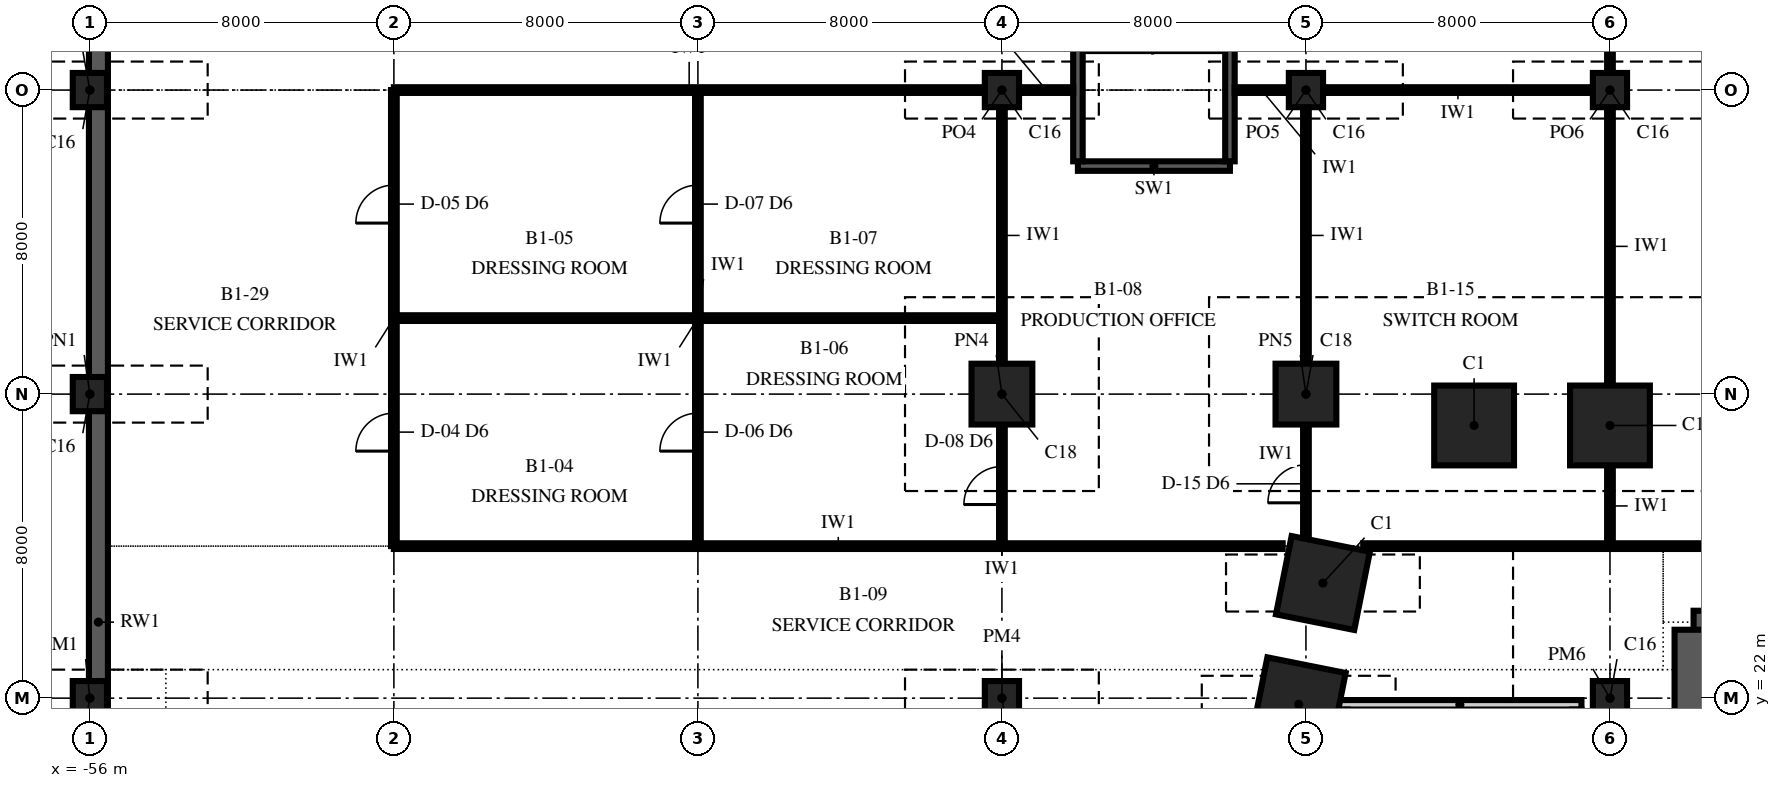
"""IFC4 building model, lengths in metres.
Left out: names, types, materials, properties, quantities, classifications, styles, units other than length and angle.
Written with IfcOpenShell. Run it as: python <this file> out.ifc"""

import sys

from ifc_helpers import new_model, si_unit, direction, frame, frame_2d, origin, origin_2d, place, context, subcontext, project, spatial, polyline, rectangle, outline, extrude, element, fill, save


model = new_model("IFC4")
c1 = context("Model", 3, precision=1e-05, world=origin(), true_north=direction((0.0, 1.0)))
c2 = subcontext(c1, "Body", "Model", "MODEL_VIEW")
j1 = project(units=[si_unit("LENGTHUNIT", "METRE"), si_unit("PLANEANGLEUNIT", "RADIAN")], contexts=[c1])
p1 = place(None, origin())
s1 = spatial("IfcSite", under=j1, at=p1, CompositionType="ELEMENT")
p2 = place(p1, origin())
s2 = spatial("IfcBuilding", under=s1, at=p2, CompositionType="ELEMENT")
p3 = place(p2, frame((0.0, 0.0, -7.0)))
s3 = spatial("IfcBuildingStorey", under=s2, at=p3, CompositionType="ELEMENT", Elevation=-7.0)
for number, where, z_axis, x_axis in (
    (1, (-16.0, 29.175, -0.6), (0.0, 0.0, 1.0), (-1.0, 0.0, 0.0)),
    (2, (-19.575, 29.175, -0.6), (0.0, 0.0, 1.0), (-1.0, 0.0, 0.0)),
    (3, (-23.553, 25.029, -0.6), (0.0, 0.0, 1.0), (-0.196, -0.981, 0.0)),
    (4, (-24.191, 21.838, -0.6), (0.0, 0.0, 1.0), (-0.196, -0.981, 0.0)),
):
    element("IfcColumn", number, at=place(p3, frame(where, z_axis=z_axis, x_axis=x_axis)), inside=s3, PredefinedType="COLUMN", context=c2, shape_type="SweptSolid", body=[
        extrude(rectangle(XDim=2.1, YDim=2.1, at=origin_2d()), origin(), (0.0, 0.0, 1.0), 7.6),
    ])
for number, where, z_axis, x_axis in (
    (5, (-56.0, 22.0, -0.6), (0.0, 0.0, 1.0), (1.0, 0.0, 0.0)),
    (6, (-56.0, 30.0, -0.6), (0.0, 0.0, 1.0), (1.0, 0.0, 0.0)),
    (7, (-56.0, 38.0, -0.6), (0.0, 0.0, 1.0), (1.0, 0.0, 0.0)),
    (8, (-32.0, 22.0, -0.6), (0.0, 0.0, 1.0), (1.0, 0.0, 0.0)),
):
    element("IfcColumn", number, at=place(p3, frame(where, z_axis=z_axis, x_axis=x_axis)), inside=s3, PredefinedType="COLUMN", context=c2, shape_type="SweptSolid", body=[
        extrude(rectangle(XDim=0.9, YDim=0.9, at=origin_2d()), origin(), (0.0, 0.0, 1.0), 7.6),
    ])
p4 = place(p3, frame((-32.0, 30.0, -0.6), z_axis=(0.0, 0.0, 1.0), x_axis=(1.0, 0.0, 0.0)))
e9 = element("IfcColumn", 9, at=p4, inside=s3, PredefinedType="COLUMN", context=c2, shape_type="SweptSolid", body=[
    extrude(rectangle(XDim=1.6, YDim=1.6, at=origin_2d()), origin(), (0.0, 0.0, 1.0), 7.6),
])
p5 = place(p3, frame((-32.0, 38.0, -0.6), z_axis=(0.0, 0.0, 1.0), x_axis=(1.0, 0.0, 0.0)))
e10 = element("IfcColumn", 10, at=p5, inside=s3, PredefinedType="COLUMN", context=c2, shape_type="SweptSolid", body=[
    extrude(rectangle(XDim=0.9, YDim=0.9, at=origin_2d()), origin(), (0.0, 0.0, 1.0), 7.6),
])
p6 = place(p3, frame((-24.0, 30.0, -0.6), z_axis=(0.0, 0.0, 1.0), x_axis=(1.0, 0.0, 0.0)))
e11 = element("IfcColumn", 11, at=p6, inside=s3, PredefinedType="COLUMN", context=c2, shape_type="SweptSolid", body=[
    extrude(rectangle(XDim=1.6, YDim=1.6, at=origin_2d()), origin(), (0.0, 0.0, 1.0), 7.6),
])
for number, where, z_axis, x_axis in (
    (12, (-24.0, 38.0, -0.6), (0.0, 0.0, 1.0), (1.0, 0.0, 0.0)),
    (13, (-16.0, 22.0, -0.6), (0.0, 0.0, 1.0), (1.0, 0.0, 0.0)),
    (14, (-16.0, 38.0, -0.6), (0.0, 0.0, 1.0), (1.0, 0.0, 0.0)),
):
    element("IfcColumn", number, at=place(p3, frame(where, z_axis=z_axis, x_axis=x_axis)), inside=s3, PredefinedType="COLUMN", context=c2, shape_type="SweptSolid", body=[
        extrude(rectangle(XDim=0.9, YDim=0.9, at=origin_2d()), origin(), (0.0, 0.0, 1.0), 7.6),
    ])
p7 = place(p3, frame((13.8, 23.8, 0.0), z_axis=(0.0, 0.0, 1.0), x_axis=(-1.0, 0.0, 0.0)))
e15 = element("IfcWall", 15, at=p7, inside=s3, PredefinedType="SHEAR", context=c2, shape_type="SweptSolid", body=[
    extrude(rectangle(XDim=27.6, YDim=1.0, at=frame_2d((13.8, 0.0))), origin(), (0.0, 0.0, 1.0), 7.0),
])
p8 = place(p7, frame((21.7, 0.0, 0.0)))
e16 = element("IfcOpeningElement", 16, at=p8, cuts=e15, PredefinedType="OPENING", context=c2, shape_type="SweptSolid", body=[
    extrude(rectangle(XDim=1.0, YDim=2.1, at=frame_2d((0.5, 1.05))), frame((0.0, 0.515, 0.0), z_axis=(0.0, -1.0, 0.0), x_axis=(1.0, 0.0, 0.0)), (0.0, 0.0, 1.0), 1.03),
])
p9 = place(p7, frame((4.9, 0.0, 0.0)))
e17 = element("IfcOpeningElement", 17, at=p9, cuts=e15, PredefinedType="OPENING", context=c2, shape_type="SweptSolid", body=[
    extrude(rectangle(XDim=1.0, YDim=2.1, at=frame_2d((0.5, 1.05))), frame((0.0, 0.515, 0.0), z_axis=(0.0, -1.0, 0.0), x_axis=(1.0, 0.0, 0.0)), (0.0, 0.0, 1.0), 1.03),
])
p10 = place(p7, frame((17.3, 0.0, 0.0)))
e18 = element("IfcOpeningElement", 18, at=p10, cuts=e15, PredefinedType="OPENING", context=c2, shape_type="SweptSolid", body=[
    extrude(rectangle(XDim=1.0, YDim=2.1, at=frame_2d((0.5, 1.05))), frame((0.0, 0.515, 0.0), z_axis=(0.0, -1.0, 0.0), x_axis=(1.0, 0.0, 0.0)), (0.0, 0.0, 1.0), 1.03),
])
p11 = place(p7, frame((13.3, 0.0, 0.0)))
e19 = element("IfcOpeningElement", 19, at=p11, cuts=e15, PredefinedType="OPENING", context=c2, shape_type="SweptSolid", body=[
    extrude(rectangle(XDim=1.0, YDim=2.1, at=frame_2d((0.5, 1.05))), frame((0.0, 0.515, 0.0), z_axis=(0.0, -1.0, 0.0), x_axis=(1.0, 0.0, 0.0)), (0.0, 0.0, 1.0), 1.03),
])
p12 = place(p7, frame((9.3, 0.0, 0.0)))
e20 = element("IfcOpeningElement", 20, at=p12, cuts=e15, PredefinedType="OPENING", context=c2, shape_type="SweptSolid", body=[
    extrude(rectangle(XDim=1.0, YDim=2.1, at=frame_2d((0.5, 1.05))), frame((0.0, 0.515, 0.0), z_axis=(0.0, -1.0, 0.0), x_axis=(1.0, 0.0, 0.0)), (0.0, 0.0, 1.0), 1.03),
])
p13 = place(p3, frame((-13.8, 23.8, 0.0), z_axis=(0.0, 0.0, 1.0), x_axis=(0.0, -1.0, 0.0)))
e21 = element("IfcWall", 21, at=p13, inside=s3, PredefinedType="SHEAR", context=c2, shape_type="SweptSolid", body=[
    extrude(outline(polyline([(0.0, -0.5), (17.6, -0.5), (17.6, 0.0), (17.1, 0.0), (17.1, 0.5), (0.5, 0.5), (0.5, 0.0), (0.0, 0.0), (0.0, -0.5)])), origin(), (0.0, 0.0, 1.0), 7.0),
])
p14 = place(p13, frame((11.7, 0.0, 0.0)))
e22 = element("IfcOpeningElement", 22, at=p14, cuts=e21, PredefinedType="OPENING", context=c2, shape_type="SweptSolid", body=[
    extrude(rectangle(XDim=1.8, YDim=2.4, at=frame_2d((0.9, 1.2))), frame((0.0, 0.515, 0.0), z_axis=(0.0, -1.0, 0.0), x_axis=(1.0, 0.0, 0.0)), (0.0, 0.0, 1.0), 1.03),
])
p15 = place(p3, frame((-55.775, 40.0, 0.0), z_axis=(0.0, 0.0, 1.0), x_axis=(0.0, -1.0, 0.0)))
e23 = element("IfcWall", 23, at=p15, inside=s3, PredefinedType="SOLIDWALL", context=c2, shape_type="SweptSolid", body=[
    extrude(rectangle(XDim=32.0, YDim=0.5, at=frame_2d((16.0, 0.0))), origin(), (0.0, 0.0, 1.0), 7.0),
])
p16 = place(p3, frame((-30.0, 36.0, 0.0), z_axis=(0.0, 0.0, 1.0), x_axis=(1.0, 0.0, 0.0)))
e24 = element("IfcWall", 24, at=p16, inside=s3, PredefinedType="SOLIDWALL", context=c2, shape_type="SweptSolid", body=[
    extrude(rectangle(XDim=4.0, YDim=0.25, at=frame_2d((2.0, 0.0))), origin(), (0.0, 0.0, 1.0), 7.0),
])
p17 = place(p3, frame((-26.0, 36.125, 0.0), z_axis=(0.0, 0.0, 1.0), x_axis=(0.0, 1.0, 0.0)))
e25 = element("IfcWall", 25, at=p17, inside=s3, PredefinedType="SOLIDWALL", context=c2, shape_type="SweptSolid", body=[
    extrude(rectangle(XDim=7.75, YDim=0.25, at=frame_2d((3.875, 0.0))), origin(), (0.0, 0.0, 1.0), 7.0),
])
p18 = place(p17, frame((5.85, 0.0, 0.0)))
e26 = element("IfcOpeningElement", 26, at=p18, cuts=e25, PredefinedType="OPENING", context=c2, shape_type="SweptSolid", body=[
    extrude(rectangle(XDim=1.6, YDim=2.1, at=frame_2d((0.8, 1.05))), frame((0.0, 0.14, 0.0), z_axis=(0.0, -1.0, 0.0), x_axis=(1.0, 0.0, 0.0)), (0.0, 0.0, 1.0), 0.28),
])
p19 = place(p3, frame((-30.0, 43.875, 0.0), z_axis=(0.0, 0.0, 1.0), x_axis=(0.0, -1.0, 0.0)))
e27 = element("IfcWall", 27, at=p19, inside=s3, PredefinedType="SOLIDWALL", context=c2, shape_type="SweptSolid", body=[
    extrude(rectangle(XDim=7.75, YDim=0.25, at=frame_2d((3.875, 0.0))), origin(), (0.0, 0.0, 1.0), 7.0),
])
p20 = place(p3, frame((-16.75, 21.825, 0.0), z_axis=(0.0, 0.0, 1.0), x_axis=(-1.0, 0.0, 0.0)))
e28 = element("IfcWall", 28, at=p20, inside=s3, PredefinedType="SOLIDWALL", context=c2, shape_type="SweptSolid", body=[
    extrude(rectangle(XDim=6.4, YDim=0.25, at=frame_2d((3.2, 0.0))), origin(), (0.0, 0.0, 1.0), 7.0),
])
p21 = place(p3, frame((-48.0, 26.0, 0.0), z_axis=(0.0, 0.0, 1.0), x_axis=(0.0, 1.0, 0.0)))
e29 = element("IfcWall", 29, at=p21, inside=s3, PredefinedType="PARTITIONING", context=c2, shape_type="SweptSolid", body=[
    extrude(rectangle(XDim=12.0, YDim=0.15, at=frame_2d((6.0, 0.0))), origin(), (0.0, 0.0, 1.0), 6.7),
])
p22 = place(p21, frame((2.5, 0.0, 0.0)))
e30 = element("IfcOpeningElement", 30, at=p22, cuts=e29, PredefinedType="OPENING", context=c2, shape_type="SweptSolid", body=[
    extrude(rectangle(XDim=1.0, YDim=2.1, at=frame_2d((0.5, 1.05))), frame((0.0, 0.09, 0.0), z_axis=(0.0, -1.0, 0.0), x_axis=(1.0, 0.0, 0.0)), (0.0, 0.0, 1.0), 0.18),
])
p23 = place(p21, frame((8.5, 0.0, 0.0)))
e31 = element("IfcOpeningElement", 31, at=p23, cuts=e29, PredefinedType="OPENING", context=c2, shape_type="SweptSolid", body=[
    extrude(rectangle(XDim=1.0, YDim=2.1, at=frame_2d((0.5, 1.05))), frame((0.0, 0.09, 0.0), z_axis=(0.0, -1.0, 0.0), x_axis=(1.0, 0.0, 0.0)), (0.0, 0.0, 1.0), 0.18),
])
p24 = place(p3, frame((-40.0, 26.0, 0.0), z_axis=(0.0, 0.0, 1.0), x_axis=(0.0, 1.0, 0.0)))
e32 = element("IfcWall", 32, at=p24, inside=s3, PredefinedType="PARTITIONING", context=c2, shape_type="SweptSolid", body=[
    extrude(rectangle(XDim=12.0, YDim=0.15, at=frame_2d((6.0, 0.0))), origin(), (0.0, 0.0, 1.0), 6.7),
])
p25 = place(p24, frame((2.5, 0.0, 0.0)))
e33 = element("IfcOpeningElement", 33, at=p25, cuts=e32, PredefinedType="OPENING", context=c2, shape_type="SweptSolid", body=[
    extrude(rectangle(XDim=1.0, YDim=2.1, at=frame_2d((0.5, 1.05))), frame((0.0, 0.09, 0.0), z_axis=(0.0, -1.0, 0.0), x_axis=(1.0, 0.0, 0.0)), (0.0, 0.0, 1.0), 0.18),
])
p26 = place(p24, frame((8.5, 0.0, 0.0)))
e34 = element("IfcOpeningElement", 34, at=p26, cuts=e32, PredefinedType="OPENING", context=c2, shape_type="SweptSolid", body=[
    extrude(rectangle(XDim=1.0, YDim=2.1, at=frame_2d((0.5, 1.05))), frame((0.0, 0.09, 0.0), z_axis=(0.0, -1.0, 0.0), x_axis=(1.0, 0.0, 0.0)), (0.0, 0.0, 1.0), 0.18),
])
p27 = place(p3, frame((-32.0, 26.0, 0.0), z_axis=(0.0, 0.0, 1.0), x_axis=(0.0, 1.0, 0.0)))
e35 = element("IfcWall", 35, at=p27, inside=s3, PredefinedType="PARTITIONING", context=c2, shape_type="SweptSolid", body=[
    extrude(rectangle(XDim=3.19, YDim=0.15, at=frame_2d((1.595, 0.0))), origin(), (0.0, 0.0, 1.0), 6.05),
])
p28 = place(p27, frame((1.095, 0.0, 0.0)))
e36 = element("IfcOpeningElement", 36, at=p28, cuts=e35, PredefinedType="OPENING", context=c2, shape_type="SweptSolid", body=[
    extrude(rectangle(XDim=1.0, YDim=2.1, at=frame_2d((0.5, 1.05))), frame((0.0, 0.09, 0.0), z_axis=(0.0, -1.0, 0.0), x_axis=(1.0, 0.0, 0.0)), (0.0, 0.0, 1.0), 0.18),
])
p29 = place(p3, frame((-32.0, 30.81, 0.0), z_axis=(0.0, 0.0, 1.0), x_axis=(0.0, 1.0, 0.0)))
e37 = element("IfcWall", 37, at=p29, inside=s3, PredefinedType="PARTITIONING", context=c2, shape_type="SweptSolid", body=[
    extrude(rectangle(XDim=6.73, YDim=0.15, at=frame_2d((3.365, 0.0))), origin(), (0.0, 0.0, 1.0), 6.05),
])
p30 = place(p3, frame((-24.0, 26.089, 0.0), z_axis=(0.0, 0.0, 1.0), x_axis=(0.0, 1.0, 0.0)))
e38 = element("IfcWall", 38, at=p30, inside=s3, PredefinedType="PARTITIONING", context=c2, shape_type="SweptSolid", body=[
    extrude(rectangle(XDim=3.101, YDim=0.15, at=frame_2d((1.55, 0.0))), origin(), (0.0, 0.0, 1.0), 6.7),
])
p31 = place(p30, frame((1.05, 0.0, 0.0)))
e39 = element("IfcOpeningElement", 39, at=p31, cuts=e38, PredefinedType="OPENING", context=c2, shape_type="SweptSolid", body=[
    extrude(rectangle(XDim=1.0, YDim=2.1, at=frame_2d((0.5, 1.05))), frame((0.0, 0.09, 0.0), z_axis=(0.0, -1.0, 0.0), x_axis=(1.0, 0.0, 0.0)), (0.0, 0.0, 1.0), 0.18),
])
p32 = place(p3, frame((-24.0, 30.81, 0.0), z_axis=(0.0, 0.0, 1.0), x_axis=(0.0, 1.0, 0.0)))
e40 = element("IfcWall", 40, at=p32, inside=s3, PredefinedType="PARTITIONING", context=c2, shape_type="SweptSolid", body=[
    extrude(rectangle(XDim=6.73, YDim=0.15, at=frame_2d((3.365, 0.0))), origin(), (0.0, 0.0, 1.0), 6.05),
])
p33 = place(p3, frame((-16.0, 26.0, 0.0), z_axis=(0.0, 0.0, 1.0), x_axis=(0.0, 1.0, 0.0)))
e41 = element("IfcWall", 41, at=p33, inside=s3, PredefinedType="PARTITIONING", context=c2, shape_type="SweptSolid", body=[
    extrude(rectangle(XDim=2.115, YDim=0.15, at=frame_2d((1.058, 0.0))), origin(), (0.0, 0.0, 1.0), 6.7),
])
p34 = place(p3, frame((-16.0, 30.235, 0.0), z_axis=(0.0, 0.0, 1.0), x_axis=(0.0, 1.0, 0.0)))
e42 = element("IfcWall", 42, at=p34, inside=s3, PredefinedType="PARTITIONING", context=c2, shape_type="SweptSolid", body=[
    extrude(rectangle(XDim=7.305, YDim=0.15, at=frame_2d((3.652, 0.0))), origin(), (0.0, 0.0, 1.0), 6.7),
])
p35 = place(p3, frame((-16.0, 38.46, 0.0), z_axis=(0.0, 0.0, 1.0), x_axis=(0.0, 1.0, 0.0)))
e43 = element("IfcWall", 43, at=p35, inside=s3, PredefinedType="PARTITIONING", context=c2, shape_type="SweptSolid", body=[
    extrude(rectangle(XDim=7.08, YDim=0.15, at=frame_2d((3.54, 0.0))), origin(), (0.0, 0.0, 1.0), 6.05),
])
p36 = place(p3, frame((-48.0, 26.0, 0.0), z_axis=(0.0, 0.0, 1.0), x_axis=(1.0, 0.0, 0.0)))
e44 = element("IfcWall", 44, at=p36, inside=s3, PredefinedType="PARTITIONING", context=c2, shape_type="SweptSolid", body=[
    extrude(rectangle(XDim=23.387, YDim=0.15, at=frame_2d((11.694, 0.0))), origin(), (0.0, 0.0, 1.0), 6.7),
])
p37 = place(p3, frame((-22.493, 26.0, 0.0), z_axis=(0.0, 0.0, 1.0), x_axis=(1.0, 0.0, 0.0)))
e45 = element("IfcWall", 45, at=p37, inside=s3, PredefinedType="PARTITIONING", context=c2, shape_type="SweptSolid", body=[
    extrude(rectangle(XDim=44.986, YDim=0.15, at=frame_2d((22.493, 0.0))), origin(), (0.0, 0.0, 1.0), 6.7),
])
p38 = place(p37, frame((15.993, 0.0, 0.0)))
e46 = element("IfcOpeningElement", 46, at=p38, cuts=e45, PredefinedType="OPENING", context=c2, shape_type="SweptSolid", body=[
    extrude(rectangle(XDim=1.0, YDim=2.1, at=frame_2d((0.5, 1.05))), frame((0.0, 0.09, 0.0), z_axis=(0.0, -1.0, 0.0), x_axis=(1.0, 0.0, 0.0)), (0.0, 0.0, 1.0), 0.18),
])
p39 = place(p37, frame((27.993, 0.0, 0.0)))
e47 = element("IfcOpeningElement", 47, at=p39, cuts=e45, PredefinedType="OPENING", context=c2, shape_type="SweptSolid", body=[
    extrude(rectangle(XDim=1.0, YDim=2.1, at=frame_2d((0.5, 1.05))), frame((0.0, 0.09, 0.0), z_axis=(0.0, -1.0, 0.0), x_axis=(1.0, 0.0, 0.0)), (0.0, 0.0, 1.0), 0.18),
])
p40 = place(p3, frame((-48.0, 32.0, 0.0), z_axis=(0.0, 0.0, 1.0), x_axis=(1.0, 0.0, 0.0)))
e48 = element("IfcWall", 48, at=p40, inside=s3, PredefinedType="PARTITIONING", context=c2, shape_type="SweptSolid", body=[
    extrude(rectangle(XDim=16.0, YDim=0.15, at=frame_2d((8.0, 0.0))), origin(), (0.0, 0.0, 1.0), 6.7),
])
p41 = place(p3, frame((-48.0, 38.0, 0.0), z_axis=(0.0, 0.0, 1.0), x_axis=(1.0, 0.0, 0.0)))
e49 = element("IfcWall", 49, at=p41, inside=s3, PredefinedType="PARTITIONING", context=c2, shape_type="SweptSolid", body=[
    extrude(rectangle(XDim=15.54, YDim=0.15, at=frame_2d((7.77, 0.0))), origin(), (0.0, 0.0, 1.0), 6.7),
])
for number, where, z_axis, x_axis in (
    (50, (-31.54, 38.0, 0.0), (0.0, 0.0, 1.0), (1.0, 0.0, 0.0)),
    (51, (-25.875, 38.0, 0.0), (0.0, 0.0, 1.0), (1.0, 0.0, 0.0)),
):
    element("IfcWall", number, at=place(p3, frame(where, z_axis=z_axis, x_axis=x_axis)), inside=s3, PredefinedType="PARTITIONING", context=c2, shape_type="SweptSolid", body=[
        extrude(rectangle(XDim=1.415, YDim=0.15, at=frame_2d((0.708, 0.0))), origin(), (0.0, 0.0, 1.0), 6.7),
    ])
p42 = place(p3, frame((-23.54, 38.0, 0.0), z_axis=(0.0, 0.0, 1.0), x_axis=(1.0, 0.0, 0.0)))
e52 = element("IfcWall", 52, at=p42, inside=s3, PredefinedType="PARTITIONING", context=c2, shape_type="SweptSolid", body=[
    extrude(rectangle(XDim=7.08, YDim=0.15, at=frame_2d((3.54, 0.0))), origin(), (0.0, 0.0, 1.0), 6.05),
])
p43 = place(p22, origin())
e53 = element("IfcDoor", 53, at=p43, inside=s3, OperationType="SINGLE_SWING_LEFT", PredefinedType="DOOR", context=c2, shape_type="SweptSolid", body=[
    extrude(rectangle(XDim=1.0, YDim=2.1, at=frame_2d((0.5, 1.05))), frame((0.0, 0.075, 0.0), z_axis=(0.0, -1.0, 0.0), x_axis=(1.0, 0.0, 0.0)), (0.0, 0.0, 1.0), 0.149),
])
fill(e30, e53)
p44 = place(p23, origin())
e54 = element("IfcDoor", 54, at=p44, inside=s3, OperationType="SINGLE_SWING_LEFT", PredefinedType="DOOR", context=c2, shape_type="SweptSolid", body=[
    extrude(rectangle(XDim=1.0, YDim=2.1, at=frame_2d((0.5, 1.05))), frame((0.0, 0.075, 0.0), z_axis=(0.0, -1.0, 0.0), x_axis=(1.0, 0.0, 0.0)), (0.0, 0.0, 1.0), 0.149),
])
fill(e31, e54)
p45 = place(p25, origin())
e55 = element("IfcDoor", 55, at=p45, inside=s3, OperationType="SINGLE_SWING_LEFT", PredefinedType="DOOR", context=c2, shape_type="SweptSolid", body=[
    extrude(rectangle(XDim=1.0, YDim=2.1, at=frame_2d((0.5, 1.05))), frame((0.0, 0.075, 0.0), z_axis=(0.0, -1.0, 0.0), x_axis=(1.0, 0.0, 0.0)), (0.0, 0.0, 1.0), 0.149),
])
fill(e33, e55)
p46 = place(p26, origin())
e56 = element("IfcDoor", 56, at=p46, inside=s3, OperationType="SINGLE_SWING_LEFT", PredefinedType="DOOR", context=c2, shape_type="SweptSolid", body=[
    extrude(rectangle(XDim=1.0, YDim=2.1, at=frame_2d((0.5, 1.05))), frame((0.0, 0.075, 0.0), z_axis=(0.0, -1.0, 0.0), x_axis=(1.0, 0.0, 0.0)), (0.0, 0.0, 1.0), 0.149),
])
fill(e34, e56)
p47 = place(p28, origin())
e57 = element("IfcDoor", 57, at=p47, inside=s3, OperationType="SINGLE_SWING_LEFT", PredefinedType="DOOR", context=c2, shape_type="SweptSolid", body=[
    extrude(rectangle(XDim=1.0, YDim=2.1, at=frame_2d((0.5, 1.05))), frame((0.0, 0.075, 0.0), z_axis=(0.0, -1.0, 0.0), x_axis=(1.0, 0.0, 0.0)), (0.0, 0.0, 1.0), 0.149),
])
fill(e36, e57)
p48 = place(p31, origin())
e58 = element("IfcDoor", 58, at=p48, inside=s3, OperationType="SINGLE_SWING_LEFT", PredefinedType="DOOR", context=c2, shape_type="SweptSolid", body=[
    extrude(rectangle(XDim=1.0, YDim=2.1, at=frame_2d((0.5, 1.05))), frame((0.0, 0.075, 0.0), z_axis=(0.0, -1.0, 0.0), x_axis=(1.0, 0.0, 0.0)), (0.0, 0.0, 1.0), 0.149),
])
fill(e39, e58)
save(model, sys.argv[1])
